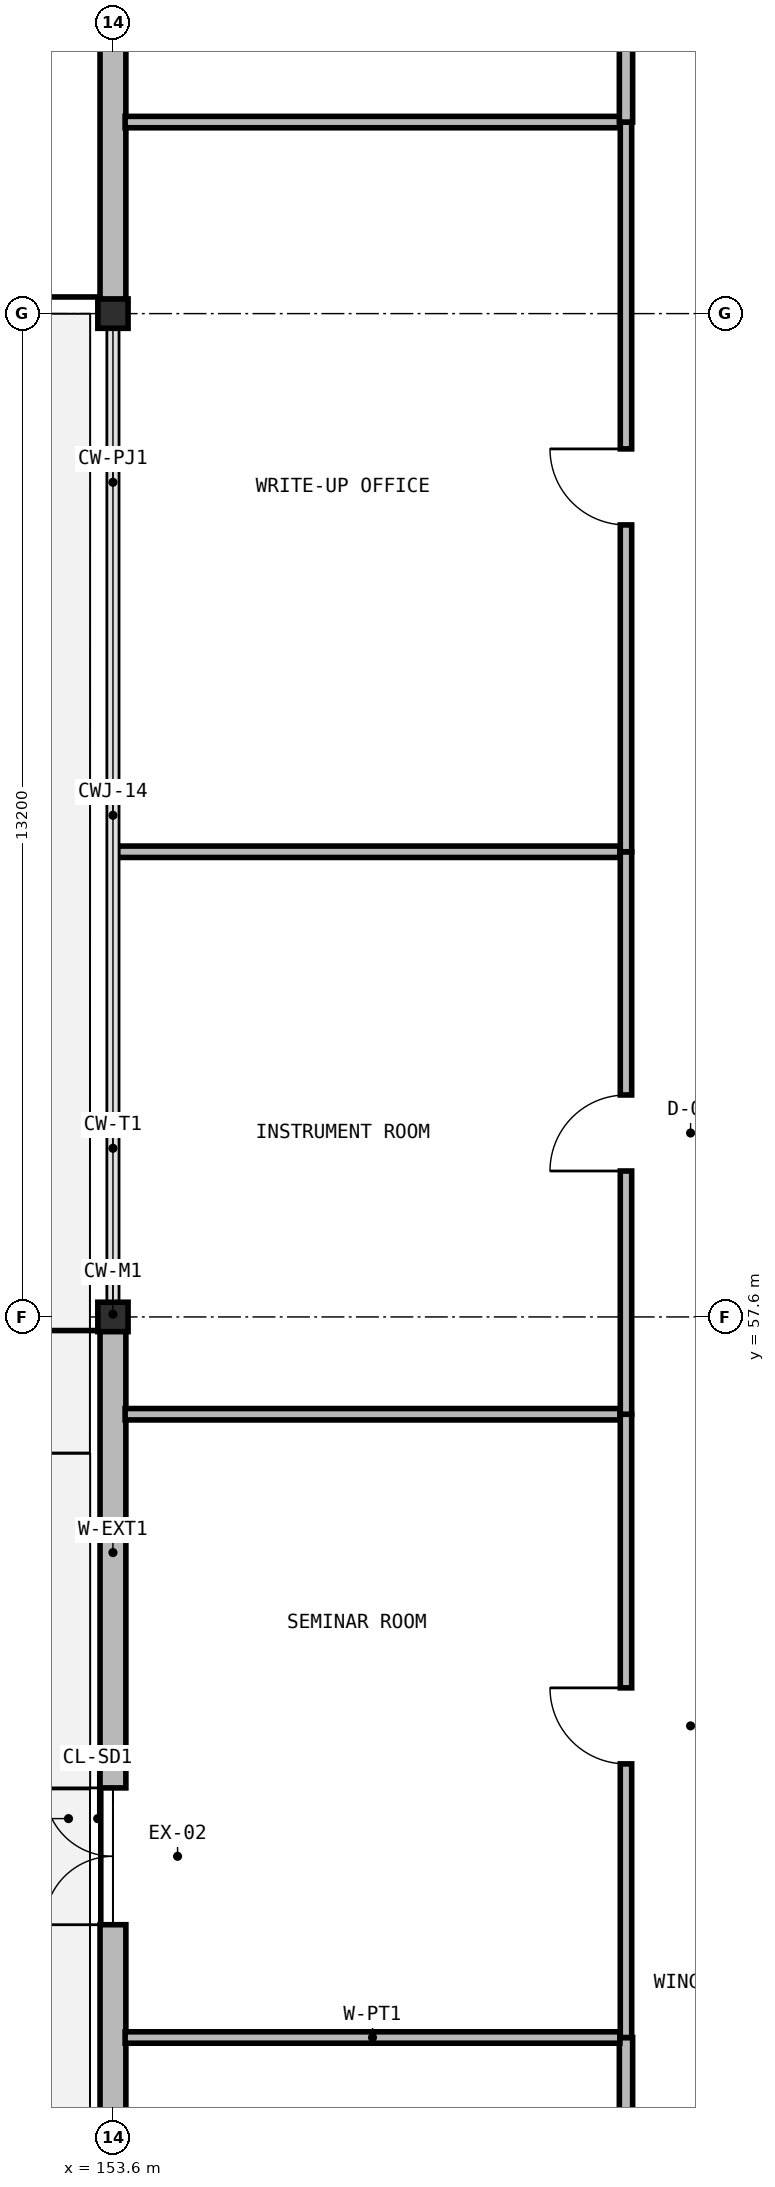
"""IFC4 building model, lengths in metres.
Left out: names, types, materials, properties, quantities, classifications, styles, units other than length and angle.
Written with IfcOpenShell. Run it as: python <this file> out.ifc"""

import sys

from ifc_helpers import new_model, si_unit, direction, frame, frame_2d, origin, origin_2d, place, context, subcontext, project, spatial, rectangle, i_section, extrude, element, fill, save


model = new_model("IFC4")
c1 = context("Model", 3, precision=1e-05, world=origin(), true_north=direction((0.0, 1.0)))
c2 = subcontext(c1, "Body", "Model", "MODEL_VIEW")
j1 = project(units=[si_unit("LENGTHUNIT", "METRE"), si_unit("PLANEANGLEUNIT", "RADIAN")], contexts=[c1])
p1 = place(None, origin())
s1 = spatial("IfcSite", under=j1, at=p1, CompositionType="ELEMENT")
p2 = place(p1, origin())
s2 = spatial("IfcBuilding", under=s1, at=p2, CompositionType="ELEMENT")
p3 = place(p2, origin())
s3 = spatial("IfcBuildingStorey", under=s2, at=p3, CompositionType="ELEMENT", Elevation=0.0)
for number, where, z_axis, x_axis in (
    (1, (153.6, 57.6, 0.0), (0.0, 0.0, 1.0), (1.0, 0.0, 0.0)),
    (2, (153.6, 70.8, 0.0), (0.0, 0.0, 1.0), (1.0, 0.0, 0.0)),
):
    element("IfcColumn", number, at=place(p3, frame(where, z_axis=z_axis, x_axis=x_axis)), inside=s3, PredefinedType="COLUMN", context=c2, shape_type="SweptSolid", body=[
        extrude(i_section(OverallWidth=0.398, OverallDepth=0.387, WebThickness=0.024, FlangeThickness=0.039, at=origin_2d()), origin(), (0.0, 0.0, 1.0), 5.25),
    ])
p4 = place(p3, frame((153.6, 44.404, 0.0), z_axis=(0.0, 0.0, 1.0), x_axis=(0.0, 1.0, 0.0)))
e3 = element("IfcWall", 3, at=p4, inside=s3, PredefinedType="SOLIDWALL", context=c2, shape_type="SweptSolid", body=[
    extrude(rectangle(XDim=13.192, YDim=0.34, at=frame_2d((6.596, 0.0))), origin(), (0.0, 0.0, 1.0), 4.395),
])
p5 = place(p4, frame((5.2, 0.0, 0.0)))
e4 = element("IfcOpeningElement", 4, at=p5, cuts=e3, PredefinedType="OPENING", context=c2, shape_type="SweptSolid", body=[
    extrude(rectangle(XDim=1.8, YDim=2.25, at=frame_2d((0.9, 1.125))), frame((0.0, 0.18, 0.0), z_axis=(0.0, -1.0, 0.0), x_axis=(1.0, 0.0, 0.0)), (0.0, 0.0, 1.0), 0.36),
])
p6 = place(p3, frame((153.6, 70.804, 0.0), z_axis=(0.0, 0.0, 1.0), x_axis=(0.0, 1.0, 0.0)))
e5 = element("IfcWall", 5, at=p6, inside=s3, PredefinedType="SOLIDWALL", context=c2, shape_type="SweptSolid", body=[
    extrude(rectangle(XDim=13.192, YDim=0.34, at=frame_2d((6.596, 0.0))), origin(), (0.0, 0.0, 1.0), 4.442),
])
p7 = place(p6, frame((5.851, 0.0, 0.95)))
e6 = element("IfcOpeningElement", 6, at=p7, cuts=e5, PredefinedType="OPENING", context=c2, shape_type="SweptSolid", body=[
    extrude(rectangle(XDim=1.49, YDim=1.73, at=frame_2d((0.745, 0.865))), frame((0.0, 0.18, 0.0), z_axis=(0.0, -1.0, 0.0), x_axis=(1.0, 0.0, 0.0)), (0.0, 0.0, 1.0), 0.36),
])
p8 = place(p3, frame((160.35, 41.32, 0.0), z_axis=(0.0, 0.0, 1.0), x_axis=(0.0, 1.0, 0.0)))
e7 = element("IfcWall", 7, at=p8, inside=s3, PredefinedType="PARTITIONING", context=c2, shape_type="SweptSolid", body=[
    extrude(rectangle(XDim=6.8, YDim=0.175, at=frame_2d((3.4, 0.0))), origin(), (0.0, 0.0, 1.0), 4.93),
])
p9 = place(p8, frame((4.13, 0.0, 0.0)))
e8 = element("IfcOpeningElement", 8, at=p9, cuts=e7, PredefinedType="OPENING", context=c2, shape_type="SweptSolid", body=[
    extrude(rectangle(XDim=1.2, YDim=2.2, at=frame_2d((0.6, 1.1))), frame((0.0, 0.097, 0.0), z_axis=(0.0, -1.0, 0.0), x_axis=(1.0, 0.0, 0.0)), (0.0, 0.0, 1.0), 0.195),
])
p10 = place(p3, frame((153.76, 48.12, 0.0), z_axis=(0.0, 0.0, 1.0), x_axis=(1.0, 0.0, 0.0)))
e9 = element("IfcWall", 9, at=p10, inside=s3, PredefinedType="PARTITIONING", context=c2, shape_type="SweptSolid", body=[
    extrude(rectangle(XDim=6.51, YDim=0.15, at=frame_2d((3.255, 0.0))), origin(), (0.0, 0.0, 1.0), 4.93),
])
p11 = place(p3, frame((160.35, 48.12, 0.0), z_axis=(0.0, 0.0, 1.0), x_axis=(0.0, 1.0, 0.0)))
e10 = element("IfcWall", 10, at=p11, inside=s3, PredefinedType="PARTITIONING", context=c2, shape_type="SweptSolid", body=[
    extrude(rectangle(XDim=8.2, YDim=0.15, at=frame_2d((4.1, 0.0))), origin(), (0.0, 0.0, 1.0), 4.93),
])
p12 = place(p11, frame((3.6, 0.0, 0.0)))
e11 = element("IfcOpeningElement", 11, at=p12, cuts=e10, PredefinedType="OPENING", context=c2, shape_type="SweptSolid", body=[
    extrude(rectangle(XDim=1.0, YDim=2.2, at=frame_2d((0.5, 1.1))), frame((0.0, 0.085, 0.0), z_axis=(0.0, -1.0, 0.0), x_axis=(1.0, 0.0, 0.0)), (0.0, 0.0, 1.0), 0.17),
])
p13 = place(p3, frame((153.76, 56.32, 0.0), z_axis=(0.0, 0.0, 1.0), x_axis=(1.0, 0.0, 0.0)))
e12 = element("IfcWall", 12, at=p13, inside=s3, PredefinedType="PARTITIONING", context=c2, shape_type="SweptSolid", body=[
    extrude(rectangle(XDim=6.51, YDim=0.15, at=frame_2d((3.255, 0.0))), origin(), (0.0, 0.0, 1.0), 4.93),
])
p14 = place(p3, frame((160.35, 56.32, 0.0), z_axis=(0.0, 0.0, 1.0), x_axis=(0.0, 1.0, 0.0)))
e13 = element("IfcWall", 13, at=p14, inside=s3, PredefinedType="PARTITIONING", context=c2, shape_type="SweptSolid", body=[
    extrude(rectangle(XDim=7.4, YDim=0.15, at=frame_2d((3.7, 0.0))), origin(), (0.0, 0.0, 1.0), 4.93),
])
p15 = place(p14, frame((3.2, 0.0, 0.0)))
e14 = element("IfcOpeningElement", 14, at=p15, cuts=e13, PredefinedType="OPENING", context=c2, shape_type="SweptSolid", body=[
    extrude(rectangle(XDim=1.0, YDim=2.2, at=frame_2d((0.5, 1.1))), frame((0.0, 0.085, 0.0), z_axis=(0.0, -1.0, 0.0), x_axis=(1.0, 0.0, 0.0)), (0.0, 0.0, 1.0), 0.17),
])
p16 = place(p3, frame((153.66, 63.72, 0.0), z_axis=(0.0, 0.0, 1.0), x_axis=(1.0, 0.0, 0.0)))
e15 = element("IfcWall", 15, at=p16, inside=s3, PredefinedType="PARTITIONING", context=c2, shape_type="SweptSolid", body=[
    extrude(rectangle(XDim=6.61, YDim=0.15, at=frame_2d((3.305, 0.0))), origin(), (0.0, 0.0, 1.0), 4.93),
])
p17 = place(p3, frame((160.35, 63.72, 0.0), z_axis=(0.0, 0.0, 1.0), x_axis=(0.0, 1.0, 0.0)))
e16 = element("IfcWall", 16, at=p17, inside=s3, PredefinedType="PARTITIONING", context=c2, shape_type="SweptSolid", body=[
    extrude(rectangle(XDim=9.6, YDim=0.15, at=frame_2d((4.8, 0.0))), origin(), (0.0, 0.0, 1.0), 4.93),
])
p18 = place(p17, frame((4.3, 0.0, 0.0)))
e17 = element("IfcOpeningElement", 17, at=p18, cuts=e16, PredefinedType="OPENING", context=c2, shape_type="SweptSolid", body=[
    extrude(rectangle(XDim=1.0, YDim=2.2, at=frame_2d((0.5, 1.1))), frame((0.0, 0.085, 0.0), z_axis=(0.0, -1.0, 0.0), x_axis=(1.0, 0.0, 0.0)), (0.0, 0.0, 1.0), 0.17),
])
p19 = place(p3, frame((153.76, 73.32, 0.0), z_axis=(0.0, 0.0, 1.0), x_axis=(1.0, 0.0, 0.0)))
e18 = element("IfcWall", 18, at=p19, inside=s3, PredefinedType="PARTITIONING", context=c2, shape_type="SweptSolid", body=[
    extrude(rectangle(XDim=6.51, YDim=0.15, at=frame_2d((3.255, 0.0))), origin(), (0.0, 0.0, 1.0), 4.93),
])
p20 = place(p3, frame((160.35, 73.32, 0.0), z_axis=(0.0, 0.0, 1.0), x_axis=(0.0, 1.0, 0.0)))
e19 = element("IfcWall", 19, at=p20, inside=s3, PredefinedType="PARTITIONING", context=c2, shape_type="SweptSolid", body=[
    extrude(rectangle(XDim=6.8, YDim=0.175, at=frame_2d((3.4, 0.0))), origin(), (0.0, 0.0, 1.0), 4.93),
])
p21 = place(p20, frame((2.8, 0.0, 0.0)))
e20 = element("IfcOpeningElement", 20, at=p21, cuts=e19, PredefinedType="OPENING", context=c2, shape_type="SweptSolid", body=[
    extrude(rectangle(XDim=1.2, YDim=2.2, at=frame_2d((0.6, 1.1))), frame((0.0, 0.097, 0.0), z_axis=(0.0, -1.0, 0.0), x_axis=(1.0, 0.0, 0.0)), (0.0, 0.0, 1.0), 0.195),
])
p22 = place(p5, origin())
e21 = element("IfcDoor", 21, at=p22, inside=s3, OperationType="DOUBLE_DOOR_SINGLE_SWING", PredefinedType="DOOR", context=c2, shape_type="SweptSolid", body=[
    extrude(rectangle(XDim=1.8, YDim=2.25, at=frame_2d((0.9, 1.125))), frame((0.0, 0.025, 0.0), z_axis=(0.0, -1.0, 0.0), x_axis=(1.0, 0.0, 0.0)), (0.0, 0.0, 1.0), 0.05),
])
fill(e4, e21)
p23 = place(p12, origin())
e22 = element("IfcDoor", 22, at=p23, inside=s3, OperationType="SINGLE_SWING_RIGHT", PredefinedType="DOOR", context=c2, shape_type="SweptSolid", body=[
    extrude(rectangle(XDim=1.0, YDim=2.2, at=frame_2d((0.5, 1.1))), frame((0.0, 0.025, 0.0), z_axis=(0.0, -1.0, 0.0), x_axis=(1.0, 0.0, 0.0)), (0.0, 0.0, 1.0), 0.05),
])
fill(e11, e22)
p24 = place(p15, origin())
e23 = element("IfcDoor", 23, at=p24, inside=s3, OperationType="SINGLE_SWING_LEFT", PredefinedType="DOOR", context=c2, shape_type="SweptSolid", body=[
    extrude(rectangle(XDim=1.0, YDim=2.2, at=frame_2d((0.5, 1.1))), frame((0.0, 0.025, 0.0), z_axis=(0.0, -1.0, 0.0), x_axis=(1.0, 0.0, 0.0)), (0.0, 0.0, 1.0), 0.05),
])
fill(e14, e23)
p25 = place(p18, origin())
e24 = element("IfcDoor", 24, at=p25, inside=s3, OperationType="SINGLE_SWING_RIGHT", PredefinedType="DOOR", context=c2, shape_type="SweptSolid", body=[
    extrude(rectangle(XDim=1.0, YDim=2.2, at=frame_2d((0.5, 1.1))), frame((0.0, 0.025, 0.0), z_axis=(0.0, -1.0, 0.0), x_axis=(1.0, 0.0, 0.0)), (0.0, 0.0, 1.0), 0.05),
])
fill(e17, e24)
save(model, sys.argv[1])
